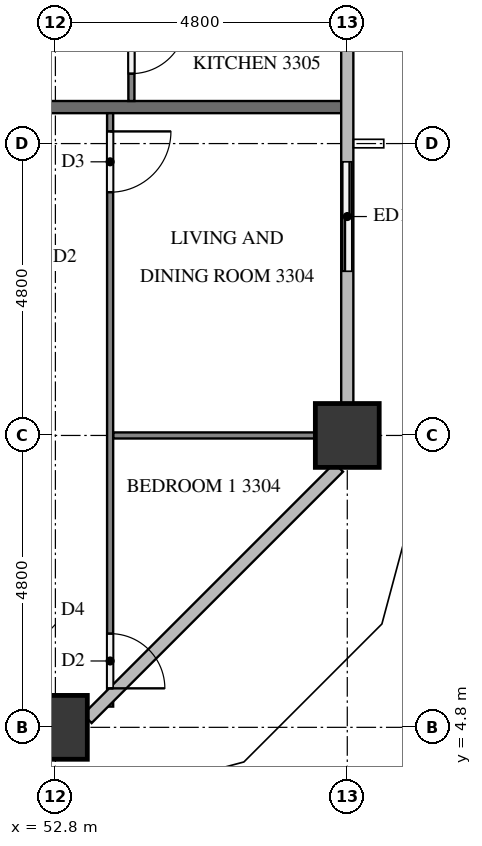
"""IFC4 building model, lengths in metres.
Left out: names, types, materials, properties, quantities, classifications, styles, units other than length and angle.
Written with IfcOpenShell. Run it as: python <this file> out.ifc"""

import sys

from ifc_helpers import new_model, si_unit, direction, frame, frame_2d, origin, origin_2d, place, context, subcontext, project, spatial, rectangle, extrude, element, fill, save


model = new_model("IFC4")
c1 = context("Model", 3, precision=1e-05, world=origin(), true_north=direction((0.0, 1.0)))
c2 = subcontext(c1, "Body", "Model", "MODEL_VIEW")
j1 = project(units=[si_unit("LENGTHUNIT", "METRE"), si_unit("PLANEANGLEUNIT", "RADIAN")], contexts=[c1])
p1 = place(None, origin())
s1 = spatial("IfcSite", under=j1, at=p1, CompositionType="ELEMENT")
p2 = place(p1, origin())
s2 = spatial("IfcBuilding", under=s1, at=p2, CompositionType="ELEMENT")
p3 = place(p2, frame((0.0, 0.0, 129.6)))
s3 = spatial("IfcBuildingStorey", under=s2, at=p3, CompositionType="ELEMENT", Elevation=129.6)
for number, where, z_axis, x_axis in (
    (1, (52.8, 4.8, 0.0), (0.0, 0.0, 1.0), (1.0, 0.0, 0.0)),
    (2, (57.6, 9.6, 0.0), (0.0, 0.0, 1.0), (1.0, 0.0, 0.0)),
):
    element("IfcColumn", number, at=place(p3, frame(where, z_axis=z_axis, x_axis=x_axis)), inside=s3, PredefinedType="COLUMN", context=c2, shape_type="SweptSolid", body=[
        extrude(rectangle(XDim=1.05, YDim=1.05, at=origin_2d()), origin(), (0.0, 0.0, 1.0), 3.2),
    ])
p4 = place(p3, frame((57.6, 12.0, 0.0), z_axis=(0.0, 0.0, 1.0), x_axis=(0.0, 1.0, 0.0)))
e3 = element("IfcWall", 3, at=p4, inside=s3, PredefinedType="SOLIDWALL", context=c2, shape_type="SweptSolid", body=[
    extrude(rectangle(XDim=2.4, YDim=0.15, at=frame_2d((1.2, 0.0))), origin(), (0.0, 0.0, 1.0), 3.2),
])
p5 = place(p4, frame((0.3, 0.0, 0.0)))
e4 = element("IfcOpeningElement", 4, at=p5, cuts=e3, PredefinedType="OPENING", context=c2, shape_type="SweptSolid", body=[
    extrude(rectangle(XDim=1.8, YDim=2.4, at=frame_2d((0.9, 1.2))), frame((0.0, 0.085, 0.0), z_axis=(0.0, -1.0, 0.0), x_axis=(1.0, 0.0, 0.0)), (0.0, 0.0, 1.0), 0.17),
])
p6 = place(p3, frame((52.5, 15.0, 0.0), z_axis=(0.0, 0.0, 1.0), x_axis=(1.0, 0.0, 0.0)))
e5 = element("IfcWall", 5, at=p6, inside=s3, PredefinedType="PARTITIONING", context=c2, shape_type="SweptSolid", body=[
    extrude(rectangle(XDim=5.0, YDim=0.2, at=frame_2d((2.5, 0.0))), origin(), (0.0, 0.0, 1.0), 3.2),
])
p7 = place(p3, frame((53.75, 9.6, 0.0), z_axis=(0.0, 0.0, 1.0), x_axis=(1.0, 0.0, 0.0)))
e6 = element("IfcWall", 6, at=p7, inside=s3, PredefinedType="PARTITIONING", context=c2, shape_type="SweptSolid", body=[
    extrude(rectangle(XDim=3.325, YDim=0.1, at=frame_2d((1.663, 0.0))), origin(), (0.0, 0.0, 1.0), 3.2),
])
p8 = place(p3, frame((53.7, 14.9, 0.0), z_axis=(0.0, 0.0, 1.0), x_axis=(0.0, -1.0, 0.0)))
e7 = element("IfcWall", 7, at=p8, inside=s3, PredefinedType="PARTITIONING", context=c2, shape_type="SweptSolid", body=[
    extrude(rectangle(XDim=9.759, YDim=0.1, at=frame_2d((4.879, 0.0))), origin(), (0.0, 0.0, 1.0), 3.2),
])
p9 = place(p8, frame((0.3, 0.0, 0.0)))
e8 = element("IfcOpeningElement", 8, at=p9, cuts=e7, PredefinedType="OPENING", context=c2, shape_type="SweptSolid", body=[
    extrude(rectangle(XDim=1.0, YDim=2.1, at=frame_2d((0.5, 1.05))), frame((0.0, 0.06, 0.0), z_axis=(0.0, -1.0, 0.0), x_axis=(1.0, 0.0, 0.0)), (0.0, 0.0, 1.0), 0.12),
])
p10 = place(p8, frame((8.559, 0.0, 0.0)))
e9 = element("IfcOpeningElement", 9, at=p10, cuts=e7, PredefinedType="OPENING", context=c2, shape_type="SweptSolid", body=[
    extrude(rectangle(XDim=0.9, YDim=2.1, at=frame_2d((0.45, 1.05))), frame((0.0, 0.06, 0.0), z_axis=(0.0, -1.0, 0.0), x_axis=(1.0, 0.0, 0.0)), (0.0, 0.0, 1.0), 0.12),
])
p11 = place(p3, frame((54.05, 37.7, 0.0), z_axis=(0.0, 0.0, 1.0), x_axis=(0.0, -1.0, 0.0)))
e10 = element("IfcWall", 10, at=p11, inside=s3, PredefinedType="PARTITIONING", context=c2, shape_type="SweptSolid", body=[
    extrude(rectangle(XDim=22.6, YDim=0.1, at=frame_2d((11.3, 0.0))), origin(), (0.0, 0.0, 1.0), 3.2),
])
p12 = place(p11, frame((2.85, 0.0, 0.0)))
e11 = element("IfcOpeningElement", 11, at=p12, cuts=e10, PredefinedType="OPENING", context=c2, shape_type="SweptSolid", body=[
    extrude(rectangle(XDim=0.9, YDim=2.1, at=frame_2d((0.45, 1.05))), frame((0.0, 0.06, 0.0), z_axis=(0.0, -1.0, 0.0), x_axis=(1.0, 0.0, 0.0)), (0.0, 0.0, 1.0), 0.12),
])
p13 = place(p11, frame((4.45, 0.0, 0.0)))
e12 = element("IfcOpeningElement", 12, at=p13, cuts=e10, PredefinedType="OPENING", context=c2, shape_type="SweptSolid", body=[
    extrude(rectangle(XDim=0.8, YDim=2.1, at=frame_2d((0.4, 1.05))), frame((0.0, 0.06, 0.0), z_axis=(0.0, -1.0, 0.0), x_axis=(1.0, 0.0, 0.0)), (0.0, 0.0, 1.0), 0.12),
])
p14 = place(p11, frame((10.05, 0.0, 0.0)))
e13 = element("IfcOpeningElement", 13, at=p14, cuts=e10, PredefinedType="OPENING", context=c2, shape_type="SweptSolid", body=[
    extrude(rectangle(XDim=0.9, YDim=2.1, at=frame_2d((0.45, 1.05))), frame((0.0, 0.06, 0.0), z_axis=(0.0, -1.0, 0.0), x_axis=(1.0, 0.0, 0.0)), (0.0, 0.0, 1.0), 0.12),
])
p15 = place(p11, frame((11.65, 0.0, 0.0)))
e14 = element("IfcOpeningElement", 14, at=p15, cuts=e10, PredefinedType="OPENING", context=c2, shape_type="SweptSolid", body=[
    extrude(rectangle(XDim=0.9, YDim=2.1, at=frame_2d((0.45, 1.05))), frame((0.0, 0.06, 0.0), z_axis=(0.0, -1.0, 0.0), x_axis=(1.0, 0.0, 0.0)), (0.0, 0.0, 1.0), 0.12),
])
p16 = place(p11, frame((19.55, 0.0, 0.0)))
e15 = element("IfcOpeningElement", 15, at=p16, cuts=e10, PredefinedType="OPENING", context=c2, shape_type="SweptSolid", body=[
    extrude(rectangle(XDim=1.0, YDim=2.1, at=frame_2d((0.5, 1.05))), frame((0.0, 0.06, 0.0), z_axis=(0.0, -1.0, 0.0), x_axis=(1.0, 0.0, 0.0)), (0.0, 0.0, 1.0), 0.12),
])
p17 = place(p11, frame((21.25, 0.0, 0.0)))
e16 = element("IfcOpeningElement", 16, at=p17, cuts=e10, PredefinedType="OPENING", context=c2, shape_type="SweptSolid", body=[
    extrude(rectangle(XDim=0.9, YDim=2.1, at=frame_2d((0.45, 1.05))), frame((0.0, 0.06, 0.0), z_axis=(0.0, -1.0, 0.0), x_axis=(1.0, 0.0, 0.0)), (0.0, 0.0, 1.0), 0.12),
])
p18 = place(p5, origin())
e17 = element("IfcDoor", 17, at=p18, inside=s3, OperationType="SLIDING_TO_RIGHT", PredefinedType="DOOR", context=c2, shape_type="SweptSolid", body=[
    extrude(rectangle(XDim=1.8, YDim=2.4, at=frame_2d((0.9, 1.2))), frame((0.0, 0.025, 0.0), z_axis=(0.0, -1.0, 0.0), x_axis=(1.0, 0.0, 0.0)), (0.0, 0.0, 1.0), 0.05),
])
fill(e4, e17)
p19 = place(p9, origin())
e18 = element("IfcDoor", 18, at=p19, inside=s3, OperationType="SINGLE_SWING_LEFT", PredefinedType="DOOR", context=c2, shape_type="SweptSolid", body=[
    extrude(rectangle(XDim=1.0, YDim=2.1, at=frame_2d((0.5, 1.05))), frame((0.0, 0.025, 0.0), z_axis=(0.0, -1.0, 0.0), x_axis=(1.0, 0.0, 0.0)), (0.0, 0.0, 1.0), 0.05),
])
fill(e8, e18)
p20 = place(p10, origin())
e19 = element("IfcDoor", 19, at=p20, inside=s3, OperationType="SINGLE_SWING_RIGHT", PredefinedType="DOOR", context=c2, shape_type="SweptSolid", body=[
    extrude(rectangle(XDim=0.9, YDim=2.1, at=frame_2d((0.45, 1.05))), frame((0.0, 0.025, 0.0), z_axis=(0.0, -1.0, 0.0), x_axis=(1.0, 0.0, 0.0)), (0.0, 0.0, 1.0), 0.05),
])
fill(e9, e19)
p21 = place(p17, origin())
e20 = element("IfcDoor", 20, at=p21, inside=s3, OperationType="SINGLE_SWING_LEFT", PredefinedType="DOOR", context=c2, shape_type="SweptSolid", body=[
    extrude(rectangle(XDim=0.9, YDim=2.1, at=frame_2d((0.45, 1.05))), frame((0.0, 0.025, 0.0), z_axis=(0.0, -1.0, 0.0), x_axis=(1.0, 0.0, 0.0)), (0.0, 0.0, 1.0), 0.05),
])
fill(e16, e20)
save(model, sys.argv[1])
